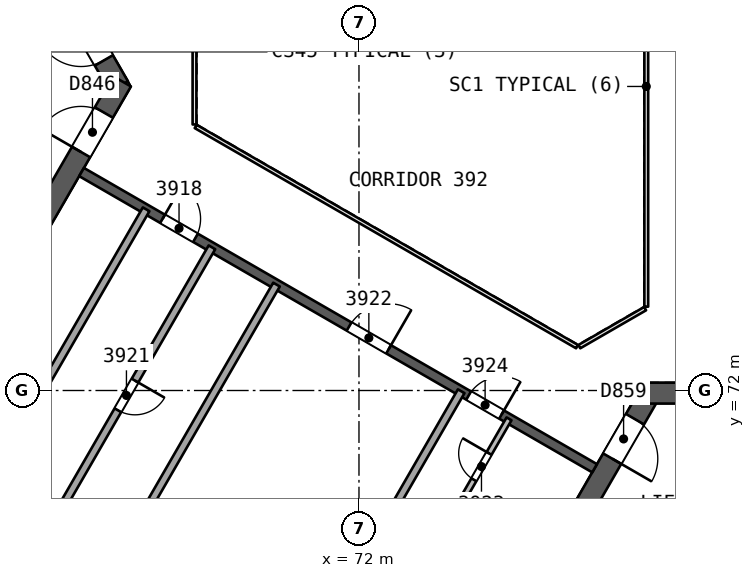
"""IFC4 building model, lengths in metres.
Left out: names, types, materials, properties, quantities, classifications, styles, units other than length and angle.
Written with IfcOpenShell. Run it as: python <this file> out.ifc"""

import sys

from ifc_helpers import new_model, si_unit, direction, frame, frame_2d, origin, place, context, subcontext, project, spatial, rectangle, extrude, element, fill, save


model = new_model("IFC4")
c1 = context("Model", 3, precision=1e-05, world=origin(), true_north=direction((0.0, 1.0)))
c2 = subcontext(c1, "Body", "Model", "MODEL_VIEW")
j1 = project(units=[si_unit("LENGTHUNIT", "METRE"), si_unit("PLANEANGLEUNIT", "RADIAN")], contexts=[c1])
p1 = place(None, origin())
s1 = spatial("IfcSite", under=j1, at=p1, CompositionType="ELEMENT")
p2 = place(p1, origin())
s2 = spatial("IfcBuilding", under=s1, at=p2, CompositionType="ELEMENT")
p3 = place(p2, frame((0.0, 0.0, 163.7)))
s3 = spatial("IfcBuildingStorey", under=s2, at=p3, CompositionType="ELEMENT", Elevation=163.7)
p4 = place(p3, frame((65.682, 80.0, 0.0), z_axis=(0.0, 0.0, 1.0), x_axis=(-0.500000202252, 0.866025287014, 0.0)))
e1 = element("IfcWall", 1, at=p4, inside=s3, PredefinedType="SHEAR", context=c2, shape_type="SweptSolid", body=[
    extrude(rectangle(XDim=10.221, YDim=0.55, at=frame_2d((5.111, 0.0))), origin(), (0.0, 0.0, 1.0), 3.7),
])
p5 = place(p4, frame((0.791, 0.0, 0.0)))
e2 = element("IfcOpeningElement", 2, at=p5, cuts=e1, PredefinedType="OPENING", context=c2, shape_type="SweptSolid", body=[
    extrude(rectangle(XDim=1.2, YDim=2.1, at=frame_2d((0.6, 1.05))), frame((0.0, 0.286, 0.0), z_axis=(0.0, -1.0, 0.0), x_axis=(1.0, 0.0, 0.0)), (0.0, 0.0, 1.0), 0.571),
])
p6 = place(p3, frame((60.709, 71.386, 0.0), z_axis=(0.0, 0.0, 1.0), x_axis=(0.500015938302, 0.866016201606, 0.0)))
e3 = element("IfcWall", 3, at=p6, inside=s3, PredefinedType="SHEAR", context=c2, shape_type="SweptSolid", body=[
    extrude(rectangle(XDim=10.105, YDim=0.55, at=frame_2d((5.053, 0.0))), origin(), (0.0, 0.0, 1.0), 3.7),
])
p7 = place(p6, frame((7.955, 0.0, 0.0)))
e4 = element("IfcOpeningElement", 4, at=p7, cuts=e3, PredefinedType="OPENING", context=c2, shape_type="SweptSolid", body=[
    extrude(rectangle(XDim=1.2, YDim=2.1, at=frame_2d((0.6, 1.05))), frame((0.0, 0.286, 0.0), z_axis=(0.0, -1.0, 0.0), x_axis=(1.0, 0.0, 0.0)), (0.0, 0.0, 1.0), 0.571),
])
p8 = place(p3, frame((79.659, 71.931, 0.0), z_axis=(0.0, 0.0, 1.0), x_axis=(-0.500000202252, -0.866025287014, 0.0)))
e5 = element("IfcWall", 5, at=p8, inside=s3, PredefinedType="SHEAR", context=c2, shape_type="SweptSolid", body=[
    extrude(rectangle(XDim=10.221, YDim=0.55, at=frame_2d((5.111, 0.0))), origin(), (0.0, 0.0, 1.0), 3.7),
])
p9 = place(p8, frame((0.791, 0.0, 0.0)))
e6 = element("IfcOpeningElement", 6, at=p9, cuts=e5, PredefinedType="OPENING", context=c2, shape_type="SweptSolid", body=[
    extrude(rectangle(XDim=1.2, YDim=2.1, at=frame_2d((0.6, 1.05))), frame((0.0, 0.286, 0.0), z_axis=(0.0, -1.0, 0.0), x_axis=(1.0, 0.0, 0.0)), (0.0, 0.0, 1.0), 0.571),
])
p10 = place(p3, frame((89.605, 71.931, 0.0), z_axis=(0.0, 0.0, 1.0), x_axis=(-1.0, 0.0, 0.0)))
e7 = element("IfcWall", 7, at=p10, inside=s3, PredefinedType="SHEAR", context=c2, shape_type="SweptSolid", body=[
    extrude(rectangle(XDim=10.105, YDim=0.55, at=frame_2d((5.052, 0.0))), origin(), (0.0, 0.0, 1.0), 3.7),
])
p11 = place(p10, frame((7.955, 0.0, 0.0)))
e8 = element("IfcOpeningElement", 8, at=p11, cuts=e7, PredefinedType="OPENING", context=c2, shape_type="SweptSolid", body=[
    extrude(rectangle(XDim=1.2, YDim=2.1, at=frame_2d((0.6, 1.05))), frame((0.0, 0.286, 0.0), z_axis=(0.0, -1.0, 0.0), x_axis=(1.0, 0.0, 0.0)), (0.0, 0.0, 1.0), 0.571),
])
p12 = place(p3, frame((64.7, 77.748, 0.0), z_axis=(0.0, 0.0, 1.0), x_axis=(0.866026492143, -0.499998114903, 0.0)))
e9 = element("IfcWall", 9, at=p12, inside=s3, PredefinedType="SHEAR", context=c2, shape_type="SweptSolid", body=[
    extrude(rectangle(XDim=15.588, YDim=0.25, at=frame_2d((7.794, 0.0))), origin(), (0.0, 0.0, 1.0), 3.25),
])
p13 = place(p12, frame((2.462, 0.0, 0.0)))
e10 = element("IfcOpeningElement", 10, at=p13, cuts=e9, PredefinedType="OPENING", context=c2, shape_type="SweptSolid", body=[
    extrude(rectangle(XDim=1.0, YDim=2.1, at=frame_2d((0.5, 1.05))), frame((0.0, 0.135, 0.0), z_axis=(0.0, -1.0, 0.0), x_axis=(1.0, 0.0, 0.0)), (0.0, 0.0, 1.0), 0.271),
])
p14 = place(p12, frame((8.129, 0.0, 0.0)))
e11 = element("IfcOpeningElement", 11, at=p14, cuts=e9, PredefinedType="OPENING", context=c2, shape_type="SweptSolid", body=[
    extrude(rectangle(XDim=1.2, YDim=2.4, at=frame_2d((0.6, 1.2))), frame((0.0, 0.135, 0.0), z_axis=(0.0, -1.0, 0.0), x_axis=(1.0, 0.0, 0.0)), (0.0, 0.0, 1.0), 0.271),
])
p15 = place(p12, frame((11.762, 0.0, 0.0)))
e12 = element("IfcOpeningElement", 12, at=p15, cuts=e9, PredefinedType="OPENING", context=c2, shape_type="SweptSolid", body=[
    extrude(rectangle(XDim=1.0, YDim=2.1, at=frame_2d((0.5, 1.05))), frame((0.0, 0.135, 0.0), z_axis=(0.0, -1.0, 0.0), x_axis=(1.0, 0.0, 0.0)), (0.0, 0.0, 1.0), 0.271),
])
p16 = place(p3, frame((68.131, 75.767, 0.0), z_axis=(0.0, 0.0, 1.0), x_axis=(-0.5000018851, -0.866024315419, 0.0)))
e13 = element("IfcWall", 13, at=p16, inside=s3, PredefinedType="PARTITIONING", context=c2, shape_type="SweptSolid", body=[
    extrude(rectangle(XDim=9.0, YDim=0.2, at=frame_2d((4.5, 0.0))), origin(), (0.0, 0.0, 1.0), 3.25),
])
p17 = place(p16, frame((4.05, 0.0, 0.0)))
e14 = element("IfcOpeningElement", 14, at=p17, cuts=e13, PredefinedType="OPENING", context=c2, shape_type="SweptSolid", body=[
    extrude(rectangle(XDim=0.9, YDim=2.1, at=frame_2d((0.45, 1.05))), frame((0.0, 0.11, 0.0), z_axis=(0.0, -1.0, 0.0), x_axis=(1.0, 0.0, 0.0)), (0.0, 0.0, 1.0), 0.221),
])
p18 = place(p3, frame((61.899, 68.973, 0.0), z_axis=(0.0, 0.0, 1.0), x_axis=(0.5000018851, 0.866024315419, 0.0)))
e15 = element("IfcWall", 15, at=p18, inside=s3, PredefinedType="PARTITIONING", context=c2, shape_type="SweptSolid", body=[
    extrude(rectangle(XDim=9.0, YDim=0.2, at=frame_2d((4.5, 0.0))), origin(), (0.0, 0.0, 1.0), 3.25),
])
for number, where, z_axis, x_axis in (
    (16, (64.054, 64.782, 0.0), (0.0, 0.0, 1.0), (0.5, 0.866, 0.0)),
    (17, (68.914, 61.977, 0.0), (0.0, 0.0, 1.0), (0.5, 0.866, 0.0)),
):
    element("IfcWall", number, at=place(p3, frame(where, z_axis=z_axis, x_axis=x_axis)), inside=s3, PredefinedType="PARTITIONING", context=c2, shape_type="SweptSolid", body=[
        extrude(rectangle(XDim=11.552, YDim=0.2, at=frame_2d((5.776, 0.0))), origin(), (0.0, 0.0, 1.0), 3.25),
    ])
p19 = place(p3, frame((74.498, 68.743, 0.0), z_axis=(0.0, 0.0, 1.0), x_axis=(0.499987231761, 0.866032775405, 0.0)))
e18 = element("IfcWall", 18, at=p19, inside=s3, PredefinedType="PARTITIONING", context=c2, shape_type="SweptSolid", body=[
    extrude(rectangle(XDim=2.9, YDim=0.15, at=frame_2d((1.45, 0.0))), origin(), (0.0, 0.0, 1.0), 3.25),
])
p20 = place(p19, frame((1.05, 0.0, 0.0)))
e19 = element("IfcOpeningElement", 19, at=p20, cuts=e18, PredefinedType="OPENING", context=c2, shape_type="SweptSolid", body=[
    extrude(rectangle(XDim=0.8, YDim=2.1, at=frame_2d((0.4, 1.05))), frame((0.0, 0.085, 0.0), z_axis=(0.0, -1.0, 0.0), x_axis=(1.0, 0.0, 0.0)), (0.0, 0.0, 1.0), 0.171),
])
p21 = place(p3, frame((89.01, 50.202, 0.0), z_axis=(0.0, 0.0, 1.0), x_axis=(-0.866025862562, 0.499999205373, 0.0)))
e20 = element("IfcWall", 20, at=p21, inside=s3, PredefinedType="SOLIDWALL", context=c2, shape_type="SweptSolid", body=[
    extrude(rectangle(XDim=54.064, YDim=0.3, at=frame_2d((27.032, 0.0))), origin(), (0.0, 0.0, 1.0), 3.25),
])
p22 = place(p21, frame((30.665, 0.0, 0.0)))
e21 = element("IfcOpeningElement", 21, at=p22, cuts=e20, PredefinedType="OPENING", context=c2, shape_type="SweptSolid", body=[
    extrude(rectangle(XDim=2.4, YDim=2.4, at=frame_2d((1.2, 1.2))), frame((0.0, 0.161, 0.0), z_axis=(0.0, -1.0, 0.0), x_axis=(1.0, 0.0, 0.0)), (0.0, 0.0, 1.0), 0.321),
])
p23 = place(p21, frame((42.011, 0.0, 0.0)))
e22 = element("IfcOpeningElement", 22, at=p23, cuts=e20, PredefinedType="OPENING", context=c2, shape_type="SweptSolid", body=[
    extrude(rectangle(XDim=2.4, YDim=2.4, at=frame_2d((1.2, 1.2))), frame((0.0, 0.161, 0.0), z_axis=(0.0, -1.0, 0.0), x_axis=(1.0, 0.0, 0.0)), (0.0, 0.0, 1.0), 0.321),
])
p24 = place(p21, frame((10.402, 0.0, 0.0)))
e23 = element("IfcOpeningElement", 23, at=p24, cuts=e20, PredefinedType="OPENING", context=c2, shape_type="SweptSolid", body=[
    extrude(rectangle(XDim=2.4, YDim=2.4, at=frame_2d((1.2, 1.2))), frame((0.0, 0.161, 0.0), z_axis=(0.0, -1.0, 0.0), x_axis=(1.0, 0.0, 0.0)), (0.0, 0.0, 1.0), 0.321),
])
p25 = place(p21, frame((25.197, 0.0, 0.9)))
e24 = element("IfcOpeningElement", 24, at=p25, cuts=e20, PredefinedType="OPENING", context=c2, shape_type="SweptSolid", body=[
    extrude(rectangle(XDim=1.8, YDim=1.5, at=frame_2d((0.9, 0.75))), frame((0.0, 0.161, 0.0), z_axis=(0.0, -1.0, 0.0), x_axis=(1.0, 0.0, 0.0)), (0.0, 0.0, 1.0), 0.321),
])
p26 = place(p3, frame((77.135, 64.952, 0.0), z_axis=(0.0, 0.0, 1.0), x_axis=(0.866031916153, 0.499988720078, 0.0)))
e25 = element("IfcWall", 25, at=p26, inside=s3, PredefinedType="SOLIDWALL", context=c2, shape_type="SweptSolid", body=[
    extrude(rectangle(XDim=11.35, YDim=0.2, at=frame_2d((5.675, 0.0))), origin(), (0.0, 0.0, 1.0), 3.25),
])
p27 = place(p3, frame((79.56, 74.206, 0.0), z_axis=(0.0, 0.0, 1.0), x_axis=(0.0, 1.0, 0.0)))
e26 = element("IfcWall", 26, at=p27, inside=s3, PredefinedType="PARTITIONING", context=c2, shape_type="SweptSolid", body=[
    extrude(rectangle(XDim=11.588, YDim=0.1, at=frame_2d((5.794, 0.0))), origin(), (0.0, 0.0, 1.0), 3.25),
])
p28 = place(p3, frame((67.672, 81.0, 0.0), z_axis=(0.0, 0.0, 1.0), x_axis=(0.0, -1.0, 0.0)))
e27 = element("IfcWall", 27, at=p28, inside=s3, PredefinedType="PARTITIONING", context=c2, shape_type="SweptSolid", body=[
    extrude(rectangle(XDim=2.0, YDim=0.1, at=frame_2d((1.0, 0.0))), origin(), (0.0, 0.0, 1.0), 3.25),
])
p29 = place(p3, frame((67.702, 78.948, 0.0), z_axis=(0.0, 0.0, 1.0), x_axis=(0.866026658274, -0.499997827154, 0.0)))
e28 = element("IfcWall", 28, at=p29, inside=s3, PredefinedType="PARTITIONING", context=c2, shape_type="SweptSolid", body=[
    extrude(rectangle(XDim=11.588, YDim=0.1, at=frame_2d((5.794, 0.0))), origin(), (0.0, 0.0, 1.0), 3.25),
])
p30 = place(p3, frame((77.798, 73.154, 0.0), z_axis=(0.0, 0.0, 1.0), x_axis=(0.866041268327, 0.499972520799, 0.0)))
e29 = element("IfcWall", 29, at=p30, inside=s3, PredefinedType="PARTITIONING", context=c2, shape_type="SweptSolid", body=[
    extrude(rectangle(XDim=2.0, YDim=0.1, at=frame_2d((1.0, 0.0))), origin(), (0.0, 0.0, 1.0), 3.25),
])
p31 = place(p13, origin())
e30 = element("IfcDoor", 30, at=p31, inside=s3, OperationType="SINGLE_SWING_LEFT", PredefinedType="NOTDEFINED", context=c2, shape_type="SweptSolid", body=[
    extrude(rectangle(XDim=1.0, YDim=2.1, at=frame_2d((0.5, 1.05))), frame((0.0, 0.025, 0.0), z_axis=(0.0, -1.0, 0.0), x_axis=(1.0, 0.0, 0.0)), (0.0, 0.0, 1.0), 0.05),
])
fill(e10, e30)
p32 = place(p17, origin())
e31 = element("IfcDoor", 31, at=p32, inside=s3, OperationType="SINGLE_SWING_LEFT", PredefinedType="NOTDEFINED", context=c2, shape_type="SweptSolid", body=[
    extrude(rectangle(XDim=0.9, YDim=2.1, at=frame_2d((0.45, 1.05))), frame((0.0, 0.025, 0.0), z_axis=(0.0, -1.0, 0.0), x_axis=(1.0, 0.0, 0.0)), (0.0, 0.0, 1.0), 0.05),
])
fill(e14, e31)
p33 = place(p14, origin())
e32 = element("IfcDoor", 32, at=p33, inside=s3, OperationType="SINGLE_SWING_RIGHT", PredefinedType="NOTDEFINED", context=c2, shape_type="SweptSolid", body=[
    extrude(rectangle(XDim=1.2, YDim=2.4, at=frame_2d((0.6, 1.2))), frame((0.0, 0.025, 0.0), z_axis=(0.0, -1.0, 0.0), x_axis=(1.0, 0.0, 0.0)), (0.0, 0.0, 1.0), 0.05),
])
fill(e11, e32)
p34 = place(p20, origin())
e33 = element("IfcDoor", 33, at=p34, inside=s3, OperationType="SINGLE_SWING_RIGHT", PredefinedType="NOTDEFINED", context=c2, shape_type="SweptSolid", body=[
    extrude(rectangle(XDim=0.8, YDim=2.1, at=frame_2d((0.4, 1.05))), frame((0.0, 0.025, 0.0), z_axis=(0.0, -1.0, 0.0), x_axis=(1.0, 0.0, 0.0)), (0.0, 0.0, 1.0), 0.05),
])
fill(e19, e33)
p35 = place(p15, origin())
e34 = element("IfcDoor", 34, at=p35, inside=s3, OperationType="SINGLE_SWING_RIGHT", PredefinedType="NOTDEFINED", context=c2, shape_type="SweptSolid", body=[
    extrude(rectangle(XDim=1.0, YDim=2.1, at=frame_2d((0.5, 1.05))), frame((0.0, 0.025, 0.0), z_axis=(0.0, -1.0, 0.0), x_axis=(1.0, 0.0, 0.0)), (0.0, 0.0, 1.0), 0.05),
])
fill(e12, e34)
p36 = place(p5, origin())
e35 = element("IfcDoor", 35, at=p36, inside=s3, OperationType="SINGLE_SWING_RIGHT", PredefinedType="NOTDEFINED", context=c2, shape_type="SweptSolid", body=[
    extrude(rectangle(XDim=1.2, YDim=2.1, at=frame_2d((0.6, 1.05))), frame((0.0, 0.025, 0.0), z_axis=(0.0, -1.0, 0.0), x_axis=(1.0, 0.0, 0.0)), (0.0, 0.0, 1.0), 0.05),
])
fill(e2, e35)
p37 = place(p7, origin())
e36 = element("IfcDoor", 36, at=p37, inside=s3, OperationType="SINGLE_SWING_LEFT", PredefinedType="NOTDEFINED", context=c2, shape_type="SweptSolid", body=[
    extrude(rectangle(XDim=1.2, YDim=2.1, at=frame_2d((0.6, 1.05))), frame((0.0, 0.025, 0.0), z_axis=(0.0, -1.0, 0.0), x_axis=(1.0, 0.0, 0.0)), (0.0, 0.0, 1.0), 0.05),
])
fill(e4, e36)
p38 = place(p9, origin())
e37 = element("IfcDoor", 37, at=p38, inside=s3, OperationType="SINGLE_SWING_RIGHT", PredefinedType="NOTDEFINED", context=c2, shape_type="SweptSolid", body=[
    extrude(rectangle(XDim=1.2, YDim=2.1, at=frame_2d((0.6, 1.05))), frame((0.0, 0.025, 0.0), z_axis=(0.0, -1.0, 0.0), x_axis=(1.0, 0.0, 0.0)), (0.0, 0.0, 1.0), 0.05),
])
fill(e6, e37)
save(model, sys.argv[1])
